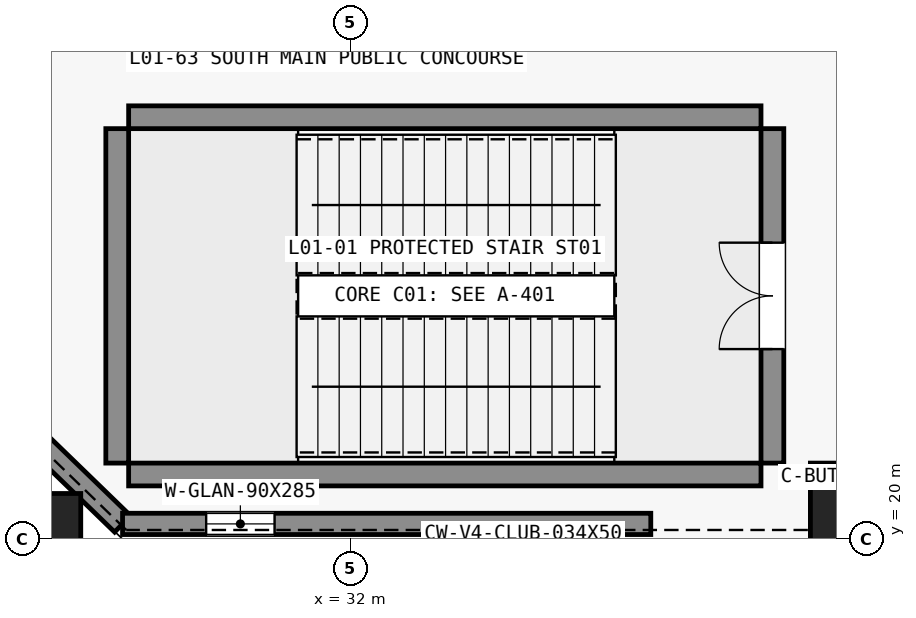
"""IFC4 building model, lengths in metres.
Left out: names, types, materials, properties, quantities, classifications, styles, units other than length and angle.
Written with IfcOpenShell. Run it as: python <this file> out.ifc"""

import sys

from ifc_helpers import new_model, si_unit, direction, frame, frame_2d, origin, origin_2d, place, context, subcontext, project, spatial, rectangle, extrude, element, fill, save


model = new_model("IFC4")
c1 = context("Model", 3, precision=1e-05, world=origin(), true_north=direction((0.0, 1.0)))
c2 = subcontext(c1, "Body", "Model", "MODEL_VIEW")
j1 = project(units=[si_unit("LENGTHUNIT", "METRE"), si_unit("PLANEANGLEUNIT", "RADIAN")], contexts=[c1])
p1 = place(None, origin())
s1 = spatial("IfcSite", under=j1, at=p1, CompositionType="ELEMENT")
p2 = place(p1, origin())
s2 = spatial("IfcBuilding", under=s1, at=p2, CompositionType="ELEMENT")
p3 = place(p2, frame((0.0, 0.0, 6.0)))
s3 = spatial("IfcBuildingStorey", under=s2, at=p3, CompositionType="ELEMENT", Elevation=6.0)
for number, where, z_axis, x_axis in (
    (1, (38.5, 20.4, 0.0), (0.0, 0.0, 1.0), (1.0, 0.0, 0.0)),
    (2, (28.0, 20.0, 0.0), (0.0, 0.0, 1.0), (1.0, 0.0, 0.0)),
):
    element("IfcColumn", number, at=place(p3, frame(where, z_axis=z_axis, x_axis=x_axis)), inside=s3, PredefinedType="PILASTER", context=c2, shape_type="SweptSolid", body=[
        extrude(rectangle(XDim=0.9, YDim=1.2, at=origin_2d()), origin(), (0.0, 0.0, 1.0), 5.4),
    ])
for number, where, z_axis, x_axis in (
    (3, (29.08, 20.85, 0.0), (0.0, 0.0, 1.0), (1.0, 0.0, 0.0)),
    (4, (29.08, 25.55, 0.0), (0.0, 0.0, 1.0), (1.0, 0.0, 0.0)),
):
    element("IfcWall", number, at=place(p3, frame(where, z_axis=z_axis, x_axis=x_axis)), inside=s3, PredefinedType="SHEAR", context=c2, shape_type="SweptSolid", body=[
        extrude(rectangle(XDim=8.32, YDim=0.3, at=frame_2d((4.16, 0.0))), origin(), (0.0, 0.0, 1.0), 5.4),
    ])
p4 = place(p3, frame((28.93, 21.0, 0.0), z_axis=(0.0, 0.0, 1.0), x_axis=(0.0, 1.0, 0.0)))
e5 = element("IfcWall", 5, at=p4, inside=s3, PredefinedType="SHEAR", context=c2, shape_type="SweptSolid", body=[
    extrude(rectangle(XDim=4.4, YDim=0.3, at=frame_2d((2.2, 0.0))), origin(), (0.0, 0.0, 1.0), 5.4),
])
p5 = place(p3, frame((37.55, 21.0, 0.0), z_axis=(0.0, 0.0, 1.0), x_axis=(0.0, 1.0, 0.0)))
e6 = element("IfcWall", 6, at=p5, inside=s3, PredefinedType="SHEAR", context=c2, shape_type="SweptSolid", body=[
    extrude(rectangle(XDim=4.4, YDim=0.3, at=frame_2d((2.2, 0.0))), origin(), (0.0, 0.0, 1.0), 5.4),
])
p6 = place(p5, frame((1.5, 0.0, 0.0)))
e7 = element("IfcOpeningElement", 7, at=p6, cuts=e6, PredefinedType="OPENING", context=c2, shape_type="SweptSolid", body=[
    extrude(rectangle(XDim=1.4, YDim=2.2, at=frame_2d((0.7, 1.1))), frame((0.0, 0.16, 0.0), z_axis=(0.0, -1.0, 0.0), x_axis=(1.0, 0.0, 0.0)), (0.0, 0.0, 1.0), 0.32),
])
p7 = place(p3, frame((16.2, 32.6, 0.0), z_axis=(0.0, 0.0, 1.0), x_axis=(0.718237441527, -0.695798086796, 0.0)))
e8 = element("IfcWall", 8, at=p7, inside=s3, PredefinedType="STANDARD", context=c2, shape_type="SweptSolid", body=[
    extrude(rectangle(XDim=17.822, YDim=0.3, at=frame_2d((8.911, 0.0))), origin(), (0.0, 0.0, 1.0), 2.775),
])
p8 = place(p3, frame((29.0, 20.2, 0.0), z_axis=(0.0, 0.0, 1.0), x_axis=(1.0, 0.0, 0.0)))
e9 = element("IfcWall", 9, at=p8, inside=s3, PredefinedType="STANDARD", context=c2, shape_type="SweptSolid", body=[
    extrude(rectangle(XDim=6.95, YDim=0.28, at=frame_2d((3.475, 0.0))), origin(), (0.0, 0.0, 1.0), 5.04),
])
p9 = place(p8, frame((1.1, 0.0, 0.95)))
e10 = element("IfcOpeningElement", 10, at=p9, cuts=e9, PredefinedType="OPENING", context=c2, shape_type="SweptSolid", body=[
    extrude(rectangle(XDim=0.9, YDim=2.85, at=frame_2d((0.45, 1.425))), frame((0.0, 0.15, 0.0), z_axis=(0.0, -1.0, 0.0), x_axis=(1.0, 0.0, 0.0)), (0.0, 0.0, 1.0), 0.3),
])
p10 = place(p9, origin())
e11 = element("IfcWindow", 11, at=p10, inside=s3, PartitioningType="DOUBLE_PANEL_VERTICAL", PredefinedType="WINDOW", context=c2, shape_type="SweptSolid", body=[
    extrude(rectangle(XDim=0.9, YDim=2.85, at=frame_2d((0.45, 1.425))), frame((0.0, 0.03, 0.0), z_axis=(0.0, -1.0, 0.0), x_axis=(1.0, 0.0, 0.0)), (0.0, 0.0, 1.0), 0.06),
])
fill(e10, e11)
p11 = place(p6, origin())
e12 = element("IfcDoor", 12, at=p11, inside=s3, OperationType="DOUBLE_DOOR_SINGLE_SWING", PredefinedType="DOOR", context=c2, shape_type="SweptSolid", body=[
    extrude(rectangle(XDim=1.4, YDim=2.2, at=frame_2d((0.7, 1.1))), frame((0.0, 0.025, 0.0), z_axis=(0.0, -1.0, 0.0), x_axis=(1.0, 0.0, 0.0)), (0.0, 0.0, 1.0), 0.05),
])
fill(e7, e12)
save(model, sys.argv[1])
